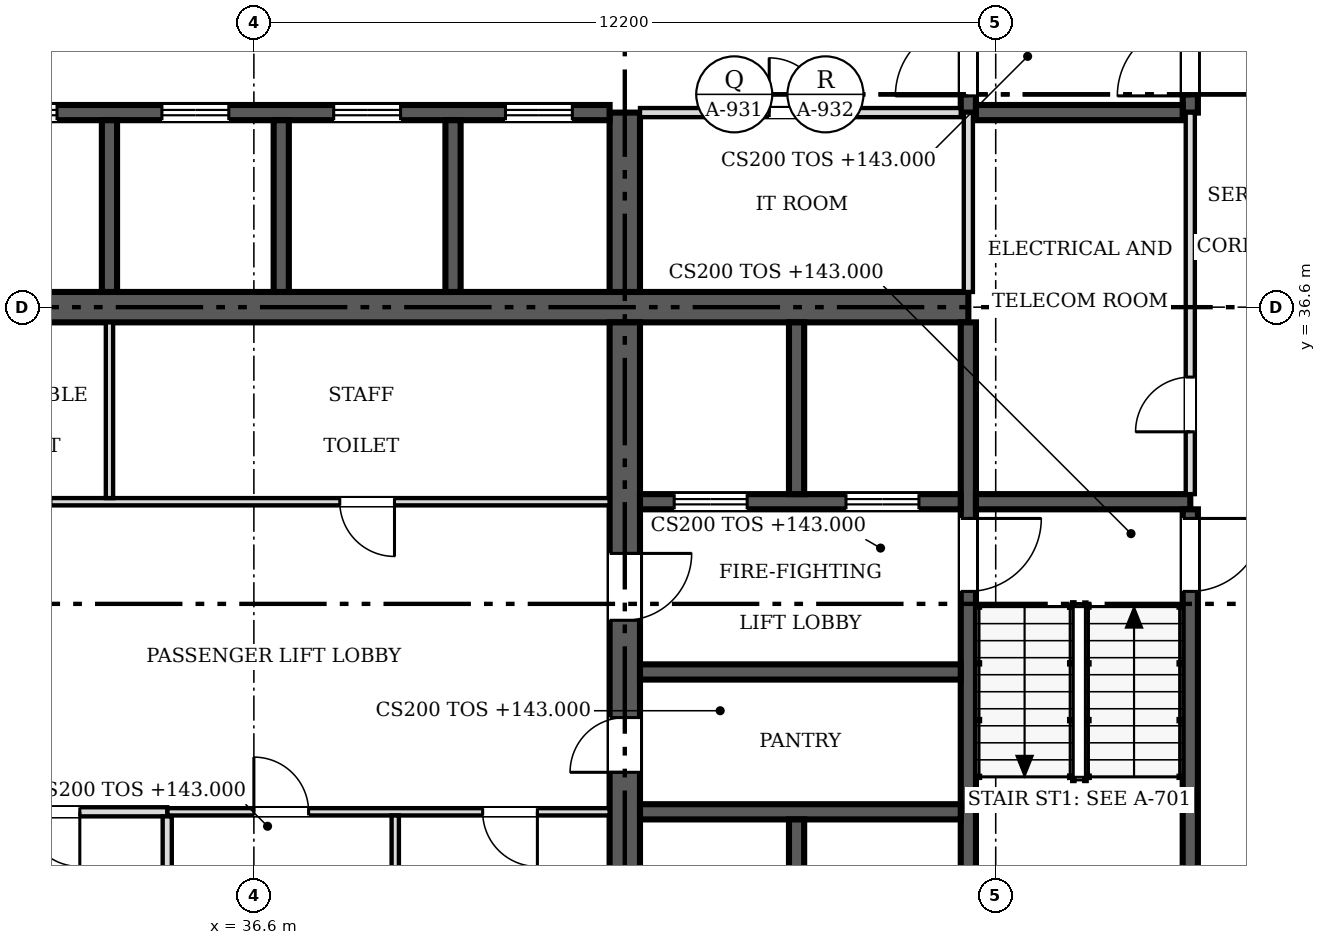
"""IFC4 building model, lengths in metres.
Left out: names, types, materials, properties, quantities, classifications, styles, units other than length and angle.
Written with IfcOpenShell. Run it as: python <this file> out.ifc"""

import sys

from ifc_helpers import new_model, si_unit, direction, frame, frame_2d, origin, place, context, subcontext, project, spatial, rectangle, extrude, source, transform, mapped, element, fill, save


model = new_model("IFC4")
c1 = context("Model", 3, precision=1e-05, world=origin(), true_north=direction((0.0, 1.0)))
c2 = subcontext(c1, "Body", "Model", "MODEL_VIEW")
j1 = project(units=[si_unit("LENGTHUNIT", "METRE"), si_unit("PLANEANGLEUNIT", "RADIAN")], contexts=[c1])
p1 = place(None, origin())
s1 = spatial("IfcSite", under=j1, at=p1, CompositionType="ELEMENT")
p2 = place(p1, origin())
s2 = spatial("IfcBuilding", under=s1, at=p2, CompositionType="ELEMENT")
p3 = place(p2, frame((0.0, 0.0, 143.0)))
s3 = spatial("IfcBuildingStorey", under=s2, at=p3, CompositionType="ELEMENT", Elevation=143.0)
p4 = place(p3, frame((31.4, 36.6, 0.0), z_axis=(0.0, 0.0, 1.0), x_axis=(1.0, 0.0, 0.0)))
e1 = element("IfcWall", 1, at=p4, inside=s3, PredefinedType="SHEAR", context=c2, shape_type="SweptSolid", body=[
    extrude(rectangle(XDim=16.95, YDim=0.5, at=frame_2d((8.475, 0.0))), origin(), (0.0, 0.0, 1.0), 3.8),
])
p5 = place(p3, frame((42.7, 36.35, 0.0), z_axis=(0.0, 0.0, 1.0), x_axis=(0.0, -1.0, 0.0)))
e2 = element("IfcWall", 2, at=p5, inside=s3, PredefinedType="SHEAR", context=c2, shape_type="SweptSolid", body=[
    extrude(rectangle(XDim=11.05, YDim=0.5, at=frame_2d((5.525, 0.0))), origin(), (0.0, 0.0, 1.0), 3.8),
])
m1 = source(origin(), c2, "Body", "SweptSolid", [
    extrude(rectangle(XDim=0.9, YDim=2.1, at=frame_2d((0.45, 1.05))), frame((0.0, 0.26, 0.0), z_axis=(0.0, -1.0, 0.0), x_axis=(1.0, 0.0, 0.0)), (0.0, 0.0, 1.0), 0.52),
])
p6 = place(p5, frame((6.5, 0.0, 0.0)))
e3 = element("IfcOpeningElement", 3, at=p6, cuts=e2, PredefinedType="OPENING", context=c2, shape_type="MappedRepresentation", body=[
    mapped(m1, transform((0.0, 0.0, 0.0), scale=1.0)),
])
m2 = source(origin(), c2, "Body", "SweptSolid", [
    extrude(rectangle(XDim=1.1, YDim=2.1, at=frame_2d((0.55, 1.05))), frame((0.0, 0.26, 0.0), z_axis=(0.0, -1.0, 0.0), x_axis=(1.0, 0.0, 0.0)), (0.0, 0.0, 1.0), 0.52),
])
p7 = place(p5, frame((3.8, 0.0, 0.0)))
e4 = element("IfcOpeningElement", 4, at=p7, cuts=e2, PredefinedType="OPENING", context=c2, shape_type="MappedRepresentation", body=[
    mapped(m2, transform((0.0, 0.0, 0.0), scale=1.0)),
])
p8 = place(p3, frame((42.7, 36.85, 0.0), z_axis=(0.0, 0.0, 1.0), x_axis=(0.0, 1.0, 0.0)))
e5 = element("IfcWall", 5, at=p8, inside=s3, PredefinedType="SHEAR", context=c2, shape_type="SweptSolid", body=[
    extrude(rectangle(XDim=2.95, YDim=0.5, at=frame_2d((1.475, 0.0))), origin(), (0.0, 0.0, 1.0), 3.8),
])
p9 = place(p3, frame((31.4, 39.8, 0.0), z_axis=(0.0, 0.0, 1.0), x_axis=(1.0, 0.0, 0.0)))
e6 = element("IfcWall", 6, at=p9, inside=s3, PredefinedType="SOLIDWALL", context=c2, shape_type="SweptSolid", body=[
    extrude(rectangle(XDim=11.05, YDim=0.25, at=frame_2d((5.525, 0.0))), origin(), (0.0, 0.0, 1.0), 3.8),
])
m3 = source(origin(), c2, "Body", "SweptSolid", [
    extrude(rectangle(XDim=1.1, YDim=2.1, at=frame_2d((0.55, 1.05))), frame((0.0, 0.135, 0.0), z_axis=(0.0, -1.0, 0.0), x_axis=(1.0, 0.0, 0.0)), (0.0, 0.0, 1.0), 0.27),
])
p10 = place(p9, frame((0.863, 0.0, 0.0)))
e7 = element("IfcOpeningElement", 7, at=p10, cuts=e6, PredefinedType="OPENING", context=c2, shape_type="MappedRepresentation", body=[
    mapped(m3, transform((0.0, 0.0, 0.0), scale=1.0)),
])
p11 = place(p9, frame((3.688, 0.0, 0.0)))
e8 = element("IfcOpeningElement", 8, at=p11, cuts=e6, PredefinedType="OPENING", context=c2, shape_type="MappedRepresentation", body=[
    mapped(m3, transform((0.0, 0.0, 0.0), scale=1.0)),
])
p12 = place(p9, frame((6.512, 0.0, 0.0)))
e9 = element("IfcOpeningElement", 9, at=p12, cuts=e6, PredefinedType="OPENING", context=c2, shape_type="MappedRepresentation", body=[
    mapped(m3, transform((0.0, 0.0, 0.0), scale=1.0)),
])
p13 = place(p9, frame((9.337, 0.0, 0.0)))
e10 = element("IfcOpeningElement", 10, at=p13, cuts=e6, PredefinedType="OPENING", context=c2, shape_type="MappedRepresentation", body=[
    mapped(m3, transform((0.0, 0.0, 0.0), scale=1.0)),
])
p14 = place(p3, frame((48.35, 36.35, 0.0), z_axis=(0.0, 0.0, 1.0), x_axis=(0.0, -1.0, 0.0)))
e11 = element("IfcWall", 11, at=p14, inside=s3, PredefinedType="SOLIDWALL", context=c2, shape_type="SweptSolid", body=[
    extrude(rectangle(XDim=11.05, YDim=0.25, at=frame_2d((5.525, 0.0))), origin(), (0.0, 0.0, 1.0), 3.8),
])
m4 = source(origin(), c2, "Body", "SweptSolid", [
    extrude(rectangle(XDim=1.2, YDim=2.1, at=frame_2d((0.6, 1.05))), frame((0.0, 0.135, 0.0), z_axis=(0.0, -1.0, 0.0), x_axis=(1.0, 0.0, 0.0)), (0.0, 0.0, 1.0), 0.27),
])
p15 = place(p14, frame((3.225, 0.0, 0.0)))
e12 = element("IfcOpeningElement", 12, at=p15, cuts=e11, PredefinedType="OPENING", context=c2, shape_type="MappedRepresentation", body=[
    mapped(m4, transform((0.0, 0.0, 0.0), scale=1.0)),
])
p16 = place(p3, frame((48.225, 33.4, 0.0), z_axis=(0.0, 0.0, 1.0), x_axis=(-1.0, 0.0, 0.0)))
e13 = element("IfcWall", 13, at=p16, inside=s3, PredefinedType="SOLIDWALL", context=c2, shape_type="SweptSolid", body=[
    extrude(rectangle(XDim=5.275, YDim=0.25, at=frame_2d((2.638, 0.0))), origin(), (0.0, 0.0, 1.0), 3.8),
])
p17 = place(p16, frame((3.512, 0.0, 0.0)))
e14 = element("IfcOpeningElement", 14, at=p17, cuts=e13, PredefinedType="OPENING", context=c2, shape_type="MappedRepresentation", body=[
    mapped(m4, transform((0.0, 0.0, 0.0), scale=1.0)),
])
p18 = place(p16, frame((0.688, 0.0, 0.0)))
e15 = element("IfcOpeningElement", 15, at=p18, cuts=e13, PredefinedType="OPENING", context=c2, shape_type="MappedRepresentation", body=[
    mapped(m4, transform((0.0, 0.0, 0.0), scale=1.0)),
])
p19 = place(p3, frame((48.475, 33.4, 0.0), z_axis=(0.0, 0.0, 1.0), x_axis=(1.0, 0.0, 0.0)))
e16 = element("IfcWall", 16, at=p19, inside=s3, PredefinedType="SOLIDWALL", context=c2, shape_type="SweptSolid", body=[
    extrude(rectangle(XDim=3.525, YDim=0.25, at=frame_2d((1.762, 0.0))), origin(), (0.0, 0.0, 1.0), 3.8),
])
p20 = place(p3, frame((48.35, 47.9, 0.0), z_axis=(0.0, 0.0, 1.0), x_axis=(0.0, -1.0, 0.0)))
e17 = element("IfcWall", 17, at=p20, inside=s3, PredefinedType="SOLIDWALL", context=c2, shape_type="SweptSolid", body=[
    extrude(rectangle(XDim=8.1, YDim=0.25, at=frame_2d((4.05, 0.0))), origin(), (0.0, 0.0, 1.0), 3.8),
])
p21 = place(p20, frame((6.625, 0.0, 0.0)))
e18 = element("IfcOpeningElement", 18, at=p21, cuts=e17, PredefinedType="OPENING", context=c2, shape_type="MappedRepresentation", body=[
    mapped(m4, transform((0.0, 0.0, 0.0), scale=1.0)),
])
p22 = place(p3, frame((52.0, 25.3, 0.0), z_axis=(0.0, 0.0, 1.0), x_axis=(0.0, 1.0, 0.0)))
e19 = element("IfcWall", 19, at=p22, inside=s3, PredefinedType="SOLIDWALL", context=c2, shape_type="SweptSolid", body=[
    extrude(rectangle(XDim=7.975, YDim=0.25, at=frame_2d((3.987, 0.0))), origin(), (0.0, 0.0, 1.0), 3.8),
])
p23 = place(p22, frame((6.625, 0.0, 0.0)))
e20 = element("IfcOpeningElement", 20, at=p23, cuts=e19, PredefinedType="OPENING", context=c2, shape_type="MappedRepresentation", body=[
    mapped(m4, transform((0.0, 0.0, 0.0), scale=1.0)),
])
p24 = place(p3, frame((52.0, 39.8, 0.0), z_axis=(0.0, 0.0, 1.0), x_axis=(0.0, 1.0, 0.0)))
e21 = element("IfcWall", 21, at=p24, inside=s3, PredefinedType="SOLIDWALL", context=c2, shape_type="SweptSolid", body=[
    extrude(rectangle(XDim=8.1, YDim=0.25, at=frame_2d((4.05, 0.0))), origin(), (0.0, 0.0, 1.0), 3.8),
])
p25 = place(p24, frame((0.275, 0.0, 0.0)))
e22 = element("IfcOpeningElement", 22, at=p25, cuts=e21, PredefinedType="OPENING", context=c2, shape_type="MappedRepresentation", body=[
    mapped(m4, transform((0.0, 0.0, 0.0), scale=1.0)),
])
for number, where, z_axis, x_axis in (
    (23, (42.95, 28.3, 0.0), (0.0, 0.0, 1.0), (1.0, 0.0, 0.0)),
    (24, (42.95, 30.6, 0.0), (0.0, 0.0, 1.0), (1.0, 0.0, 0.0)),
):
    element("IfcWall", number, at=place(p3, frame(where, z_axis=z_axis, x_axis=x_axis)), inside=s3, PredefinedType="SOLIDWALL", context=c2, shape_type="SweptSolid", body=[
        extrude(rectangle(XDim=5.275, YDim=0.25, at=frame_2d((2.638, 0.0))), origin(), (0.0, 0.0, 1.0), 3.8),
    ])
p26 = place(p3, frame((48.475, 39.8, 0.0), z_axis=(0.0, 0.0, 1.0), x_axis=(1.0, 0.0, 0.0)))
e25 = element("IfcWall", 25, at=p26, inside=s3, PredefinedType="SOLIDWALL", context=c2, shape_type="SweptSolid", body=[
    extrude(rectangle(XDim=3.4, YDim=0.25, at=frame_2d((1.7, 0.0))), origin(), (0.0, 0.0, 1.0), 3.8),
])
for number, where, z_axis, x_axis in (
    (26, (34.225, 36.85, 0.0), (0.0, 0.0, 1.0), (0.0, 1.0, 0.0)),
    (27, (37.05, 36.85, 0.0), (0.0, 0.0, 1.0), (0.0, 1.0, 0.0)),
    (28, (39.875, 36.85, 0.0), (0.0, 0.0, 1.0), (0.0, 1.0, 0.0)),
):
    element("IfcWall", number, at=place(p3, frame(where, z_axis=z_axis, x_axis=x_axis)), inside=s3, PredefinedType="SOLIDWALL", context=c2, shape_type="SweptSolid", body=[
        extrude(rectangle(XDim=2.825, YDim=0.25, at=frame_2d((1.413, 0.0))), origin(), (0.0, 0.0, 1.0), 3.8),
    ])
p27 = place(p3, frame((45.525, 33.525, 0.0), z_axis=(0.0, 0.0, 1.0), x_axis=(0.0, 1.0, 0.0)))
e29 = element("IfcWall", 29, at=p27, inside=s3, PredefinedType="SOLIDWALL", context=c2, shape_type="SweptSolid", body=[
    extrude(rectangle(XDim=2.825, YDim=0.25, at=frame_2d((1.413, 0.0))), origin(), (0.0, 0.0, 1.0), 3.8),
])
p28 = place(p3, frame((45.525, 25.3, 0.0), z_axis=(0.0, 0.0, 1.0), x_axis=(0.0, 1.0, 0.0)))
e30 = element("IfcWall", 30, at=p28, inside=s3, PredefinedType="SOLIDWALL", context=c2, shape_type="SweptSolid", body=[
    extrude(rectangle(XDim=2.875, YDim=0.25, at=frame_2d((1.438, 0.0))), origin(), (0.0, 0.0, 1.0), 3.8),
])
p29 = place(p3, frame((31.4, 33.4, 0.0), z_axis=(0.0, 0.0, 1.0), x_axis=(1.0, 0.0, 0.0)))
e31 = element("IfcWall", 31, at=p29, inside=s3, PredefinedType="PARTITIONING", context=c2, shape_type="SweptSolid", body=[
    extrude(rectangle(XDim=11.05, YDim=0.12, at=frame_2d((5.525, 0.0))), origin(), (0.0, 0.0, 1.0), 3.6),
])
m5 = source(origin(), c2, "Body", "SweptSolid", [
    extrude(rectangle(XDim=0.9, YDim=2.1, at=frame_2d((0.45, 1.05))), frame((0.0, 0.07, 0.0), z_axis=(0.0, -1.0, 0.0), x_axis=(1.0, 0.0, 0.0)), (0.0, 0.0, 1.0), 0.14),
])
p30 = place(p29, frame((0.962, 0.0, 0.0)))
e32 = element("IfcOpeningElement", 32, at=p30, cuts=e31, PredefinedType="OPENING", context=c2, shape_type="MappedRepresentation", body=[
    mapped(m5, transform((0.0, 0.0, 0.0), scale=1.0)),
])
p31 = place(p29, frame((6.613, 0.0, 0.0)))
e33 = element("IfcOpeningElement", 33, at=p31, cuts=e31, PredefinedType="OPENING", context=c2, shape_type="MappedRepresentation", body=[
    mapped(m5, transform((0.0, 0.0, 0.0), scale=1.0)),
])
p32 = place(p3, frame((42.45, 28.3, 0.0), z_axis=(0.0, 0.0, 1.0), x_axis=(-1.0, 0.0, 0.0)))
e34 = element("IfcWall", 34, at=p32, inside=s3, PredefinedType="PARTITIONING", context=c2, shape_type="SweptSolid", body=[
    extrude(rectangle(XDim=7.275, YDim=0.12, at=frame_2d((3.637, 0.0))), origin(), (0.0, 0.0, 1.0), 3.6),
])
p33 = place(p32, frame((4.95, 0.0, 0.0)))
e35 = element("IfcOpeningElement", 35, at=p33, cuts=e34, PredefinedType="OPENING", context=c2, shape_type="MappedRepresentation", body=[
    mapped(m5, transform((0.0, 0.0, 0.0), scale=1.0)),
])
p34 = place(p32, frame((1.188, 0.0, 0.0)))
e36 = element("IfcOpeningElement", 36, at=p34, cuts=e34, PredefinedType="OPENING", context=c2, shape_type="MappedRepresentation", body=[
    mapped(m5, transform((0.0, 0.0, 0.0), scale=1.0)),
])
p35 = place(p3, frame((52.0, 33.525, 0.0), z_axis=(0.0, 0.0, 1.0), x_axis=(0.0, 1.0, 0.0)))
e37 = element("IfcWall", 37, at=p35, inside=s3, PredefinedType="PARTITIONING", context=c2, shape_type="SweptSolid", body=[
    extrude(rectangle(XDim=6.275, YDim=0.15, at=frame_2d((3.138, 0.0))), origin(), (0.0, 0.0, 1.0), 3.6),
])
m6 = source(origin(), c2, "Body", "SweptSolid", [
    extrude(rectangle(XDim=0.9, YDim=2.1, at=frame_2d((0.45, 1.05))), frame((0.0, 0.085, 0.0), z_axis=(0.0, -1.0, 0.0), x_axis=(1.0, 0.0, 0.0)), (0.0, 0.0, 1.0), 0.17),
])
p36 = place(p35, frame((1.025, 0.0, 0.0)))
e38 = element("IfcOpeningElement", 38, at=p36, cuts=e37, PredefinedType="OPENING", context=c2, shape_type="MappedRepresentation", body=[
    mapped(m6, transform((0.0, 0.0, 0.0), scale=1.0)),
])
p37 = place(p3, frame((48.225, 39.8, 0.0), z_axis=(0.0, 0.0, 1.0), x_axis=(-1.0, 0.0, 0.0)))
e39 = element("IfcWall", 39, at=p37, inside=s3, PredefinedType="PARTITIONING", context=c2, shape_type="SweptSolid", body=[
    extrude(rectangle(XDim=5.275, YDim=0.15, at=frame_2d((2.638, 0.0))), origin(), (0.0, 0.0, 1.0), 3.6),
])
p38 = place(p37, frame((2.25, 0.0, 0.0)))
e40 = element("IfcOpeningElement", 40, at=p38, cuts=e39, PredefinedType="OPENING", context=c2, shape_type="MappedRepresentation", body=[
    mapped(m6, transform((0.0, 0.0, 0.0), scale=1.0)),
])
p39 = place(p3, frame((35.175, 28.3, 0.0), z_axis=(0.0, 0.0, 1.0), x_axis=(-1.0, 0.0, 0.0)))
e41 = element("IfcWall", 41, at=p39, inside=s3, PredefinedType="PARTITIONING", context=c2, shape_type="SweptSolid", body=[
    extrude(rectangle(XDim=3.775, YDim=0.15, at=frame_2d((1.888, 0.0))), origin(), (0.0, 0.0, 1.0), 3.6),
])
p40 = place(p39, frame((1.438, 0.0, 0.0)))
e42 = element("IfcOpeningElement", 42, at=p40, cuts=e41, PredefinedType="OPENING", context=c2, shape_type="MappedRepresentation", body=[
    mapped(m6, transform((0.0, 0.0, 0.0), scale=1.0)),
])
p41 = place(p3, frame((48.35, 36.85, 0.0), z_axis=(0.0, 0.0, 1.0), x_axis=(0.0, 1.0, 0.0)))
e43 = element("IfcWall", 43, at=p41, inside=s3, PredefinedType="PARTITIONING", context=c2, shape_type="SweptSolid", body=[
    extrude(rectangle(XDim=2.95, YDim=0.15, at=frame_2d((1.475, 0.0))), origin(), (0.0, 0.0, 1.0), 3.6),
])
p42 = place(p3, frame((34.225, 33.46, 0.0), z_axis=(0.0, 0.0, 1.0), x_axis=(0.0, 1.0, 0.0)))
e44 = element("IfcWall", 44, at=p42, inside=s3, PredefinedType="PARTITIONING", context=c2, shape_type="SweptSolid", body=[
    extrude(rectangle(XDim=2.89, YDim=0.12, at=frame_2d((1.445, 0.0))), origin(), (0.0, 0.0, 1.0), 3.6),
])
p43 = place(p3, frame((35.175, 25.3, 0.0), z_axis=(0.0, 0.0, 1.0), x_axis=(0.0, 1.0, 0.0)))
e45 = element("IfcWall", 45, at=p43, inside=s3, PredefinedType="PARTITIONING", context=c2, shape_type="SweptSolid", body=[
    extrude(rectangle(XDim=2.925, YDim=0.15, at=frame_2d((1.462, 0.0))), origin(), (0.0, 0.0, 1.0), 3.6),
])
p44 = place(p3, frame((38.925, 25.3, 0.0), z_axis=(0.0, 0.0, 1.0), x_axis=(0.0, 1.0, 0.0)))
e46 = element("IfcWall", 46, at=p44, inside=s3, PredefinedType="PARTITIONING", context=c2, shape_type="SweptSolid", body=[
    extrude(rectangle(XDim=2.94, YDim=0.12, at=frame_2d((1.47, 0.0))), origin(), (0.0, 0.0, 1.0), 3.6),
])
m7 = source(origin(), c2, "Body", "SweptSolid", [
    extrude(rectangle(XDim=0.9, YDim=2.1, at=frame_2d((0.45, 1.05))), frame((0.0, 0.025, 0.0), z_axis=(0.0, -1.0, 0.0), x_axis=(1.0, 0.0, 0.0)), (0.0, 0.0, 1.0), 0.05),
])
p45 = place(p6, origin())
e47 = element("IfcDoor", 47, at=p45, inside=s3, OperationType="SINGLE_SWING_RIGHT", PredefinedType="DOOR", context=c2, shape_type="MappedRepresentation", body=[
    mapped(m7, transform((0.0, 0.0, 0.0), scale=1.0)),
])
fill(e3, e47)
m8 = source(origin(), c2, "Body", "SweptSolid", [
    extrude(rectangle(XDim=1.1, YDim=2.1, at=frame_2d((0.55, 1.05))), frame((0.0, 0.025, 0.0), z_axis=(0.0, -1.0, 0.0), x_axis=(1.0, 0.0, 0.0)), (0.0, 0.0, 1.0), 0.05),
])
p46 = place(p7, origin())
e48 = element("IfcDoor", 48, at=p46, inside=s3, OperationType="SINGLE_SWING_LEFT", PredefinedType="DOOR", context=c2, shape_type="MappedRepresentation", body=[
    mapped(m8, transform((0.0, 0.0, 0.0), scale=1.0)),
])
fill(e4, e48)
p47 = place(p10, origin())
e49 = element("IfcDoor", 49, at=p47, inside=s3, OperationType="DOUBLE_DOOR_SLIDING", PredefinedType="DOOR", context=c2, shape_type="MappedRepresentation", body=[
    mapped(m8, transform((0.0, 0.0, 0.0), scale=1.0)),
])
fill(e7, e49)
p48 = place(p11, origin())
e50 = element("IfcDoor", 50, at=p48, inside=s3, OperationType="DOUBLE_DOOR_SLIDING", PredefinedType="DOOR", context=c2, shape_type="MappedRepresentation", body=[
    mapped(m8, transform((0.0, 0.0, 0.0), scale=1.0)),
])
fill(e8, e50)
p49 = place(p12, origin())
e51 = element("IfcDoor", 51, at=p49, inside=s3, OperationType="DOUBLE_DOOR_SLIDING", PredefinedType="DOOR", context=c2, shape_type="MappedRepresentation", body=[
    mapped(m8, transform((0.0, 0.0, 0.0), scale=1.0)),
])
fill(e9, e51)
p50 = place(p13, origin())
e52 = element("IfcDoor", 52, at=p50, inside=s3, OperationType="DOUBLE_DOOR_SLIDING", PredefinedType="DOOR", context=c2, shape_type="MappedRepresentation", body=[
    mapped(m8, transform((0.0, 0.0, 0.0), scale=1.0)),
])
fill(e10, e52)
m9 = source(origin(), c2, "Body", "SweptSolid", [
    extrude(rectangle(XDim=1.2, YDim=2.1, at=frame_2d((0.6, 1.05))), frame((0.0, 0.025, 0.0), z_axis=(0.0, -1.0, 0.0), x_axis=(1.0, 0.0, 0.0)), (0.0, 0.0, 1.0), 0.05),
])
p51 = place(p15, origin())
e53 = element("IfcDoor", 53, at=p51, inside=s3, OperationType="SINGLE_SWING_LEFT", PredefinedType="DOOR", context=c2, shape_type="MappedRepresentation", body=[
    mapped(m9, transform((0.0, 0.0, 0.0), scale=1.0)),
])
fill(e12, e53)
p52 = place(p17, origin())
e54 = element("IfcDoor", 54, at=p52, inside=s3, OperationType="DOUBLE_DOOR_SLIDING", PredefinedType="DOOR", context=c2, shape_type="MappedRepresentation", body=[
    mapped(m9, transform((0.0, 0.0, 0.0), scale=1.0)),
])
fill(e14, e54)
p53 = place(p18, origin())
e55 = element("IfcDoor", 55, at=p53, inside=s3, OperationType="DOUBLE_DOOR_SLIDING", PredefinedType="DOOR", context=c2, shape_type="MappedRepresentation", body=[
    mapped(m9, transform((0.0, 0.0, 0.0), scale=1.0)),
])
fill(e15, e55)
p54 = place(p21, origin())
e56 = element("IfcDoor", 56, at=p54, inside=s3, OperationType="SINGLE_SWING_RIGHT", PredefinedType="DOOR", context=c2, shape_type="MappedRepresentation", body=[
    mapped(m9, transform((0.0, 0.0, 0.0), scale=1.0)),
])
fill(e18, e56)
p55 = place(p23, origin())
e57 = element("IfcDoor", 57, at=p55, inside=s3, OperationType="SINGLE_SWING_RIGHT", PredefinedType="DOOR", context=c2, shape_type="MappedRepresentation", body=[
    mapped(m9, transform((0.0, 0.0, 0.0), scale=1.0)),
])
fill(e20, e57)
p56 = place(p25, origin())
e58 = element("IfcDoor", 58, at=p56, inside=s3, OperationType="SINGLE_SWING_LEFT", PredefinedType="DOOR", context=c2, shape_type="MappedRepresentation", body=[
    mapped(m9, transform((0.0, 0.0, 0.0), scale=1.0)),
])
fill(e22, e58)
p57 = place(p31, origin())
e59 = element("IfcDoor", 59, at=p57, inside=s3, OperationType="SINGLE_SWING_RIGHT", PredefinedType="DOOR", context=c2, shape_type="MappedRepresentation", body=[
    mapped(m7, transform((0.0, 0.0, 0.0), scale=1.0)),
])
fill(e33, e59)
p58 = place(p33, origin())
e60 = element("IfcDoor", 60, at=p58, inside=s3, OperationType="SINGLE_SWING_RIGHT", PredefinedType="DOOR", context=c2, shape_type="MappedRepresentation", body=[
    mapped(m7, transform((0.0, 0.0, 0.0), scale=1.0)),
])
fill(e35, e60)
p59 = place(p34, origin())
e61 = element("IfcDoor", 61, at=p59, inside=s3, OperationType="SINGLE_SWING_LEFT", PredefinedType="DOOR", context=c2, shape_type="MappedRepresentation", body=[
    mapped(m7, transform((0.0, 0.0, 0.0), scale=1.0)),
])
fill(e36, e61)
p60 = place(p36, origin())
e62 = element("IfcDoor", 62, at=p60, inside=s3, OperationType="SINGLE_SWING_LEFT", PredefinedType="DOOR", context=c2, shape_type="MappedRepresentation", body=[
    mapped(m7, transform((0.0, 0.0, 0.0), scale=1.0)),
])
fill(e38, e62)
p61 = place(p38, origin())
e63 = element("IfcDoor", 63, at=p61, inside=s3, OperationType="SINGLE_SWING_RIGHT", PredefinedType="DOOR", context=c2, shape_type="MappedRepresentation", body=[
    mapped(m7, transform((0.0, 0.0, 0.0), scale=1.0)),
])
fill(e40, e63)
p62 = place(p40, origin())
e64 = element("IfcDoor", 64, at=p62, inside=s3, OperationType="SINGLE_SWING_LEFT", PredefinedType="DOOR", context=c2, shape_type="MappedRepresentation", body=[
    mapped(m7, transform((0.0, 0.0, 0.0), scale=1.0)),
])
fill(e42, e64)
save(model, sys.argv[1])
